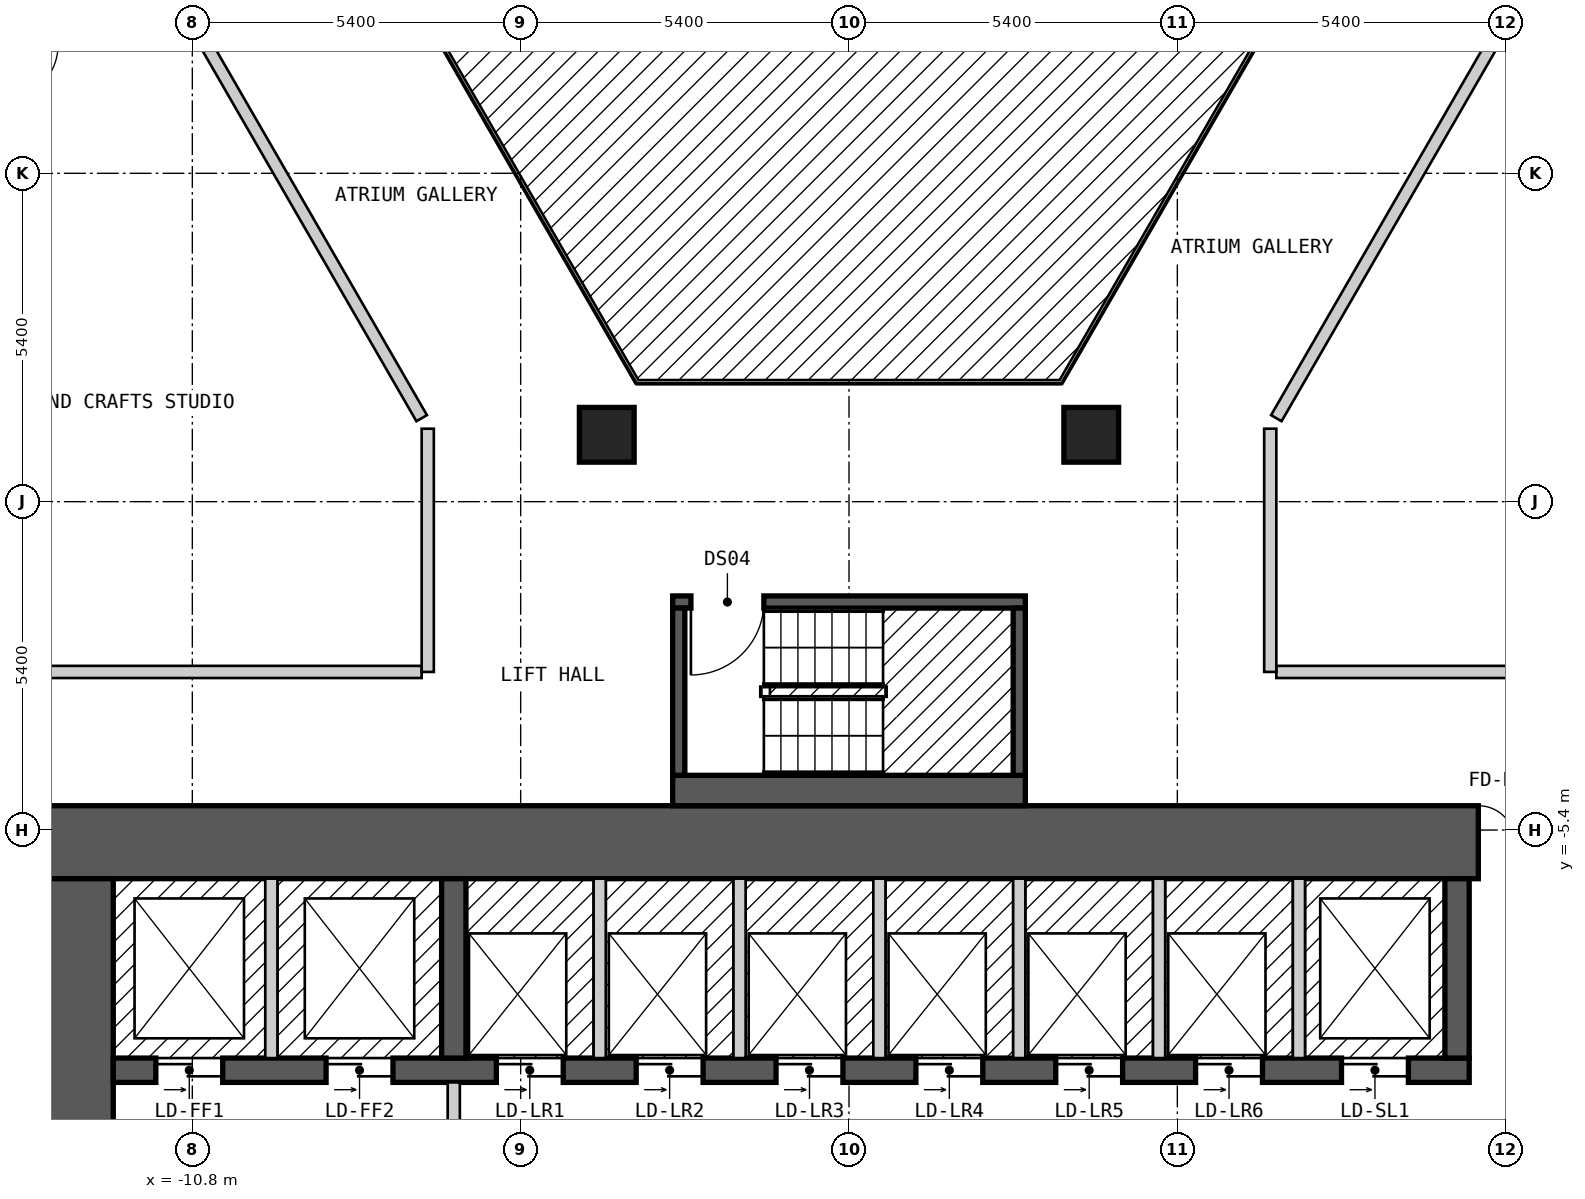
"""IFC4 building model, lengths in metres.
Left out: names, types, materials, properties, quantities, classifications, styles, units other than length and angle.
Written with IfcOpenShell. Run it as: python <this file> out.ifc"""

import sys

from ifc_helpers import new_model, si_unit, direction, frame, frame_2d, origin, origin_2d, place, context, subcontext, project, spatial, rectangle, extrude, element, fill, save


model = new_model("IFC4")
c1 = context("Model", 3, precision=1e-05, world=origin(), true_north=direction((0.0, 1.0)))
c2 = subcontext(c1, "Body", "Model", "MODEL_VIEW")
j1 = project(units=[si_unit("LENGTHUNIT", "METRE"), si_unit("PLANEANGLEUNIT", "RADIAN")], contexts=[c1])
p1 = place(None, origin())
s1 = spatial("IfcSite", under=j1, at=p1, CompositionType="ELEMENT")
p2 = place(p1, origin())
s2 = spatial("IfcBuilding", under=s1, at=p2, CompositionType="ELEMENT")
p3 = place(p2, frame((0.0, 0.0, 29.4)))
s3 = spatial("IfcBuildingStorey", under=s2, at=p3, CompositionType="ELEMENT", Elevation=29.4)
for number, where, z_axis, x_axis in (
    (1, (3.984, 1.1, 0.0), (0.0, 0.0, 1.0), (1.0, 0.0, 0.0)),
    (2, (-3.984, 1.1, 0.0), (0.0, 0.0, 1.0), (1.0, 0.0, 0.0)),
):
    element("IfcColumn", number, at=place(p3, frame(where, z_axis=z_axis, x_axis=x_axis)), inside=s3, PredefinedType="COLUMN", context=c2, shape_type="SweptSolid", body=[
        extrude(rectangle(XDim=0.9, YDim=0.9, at=origin_2d()), origin(), (0.0, 0.0, 1.0), 3.0),
    ])
p4 = place(p3, frame((-13.3, -5.6, 0.0), z_axis=(0.0, 0.0, 1.0), x_axis=(1.0, 0.0, 0.0)))
e3 = element("IfcWall", 3, at=p4, inside=s3, PredefinedType="SHEAR", context=c2, shape_type="SweptSolid", body=[
    extrude(rectangle(XDim=26.6, YDim=1.2, at=frame_2d((13.3, 0.0))), origin(), (0.0, 0.0, 1.0), 2.7),
])
p5 = place(p4, frame((23.65, 0.0, 0.0)))
e4 = element("IfcOpeningElement", 4, at=p5, cuts=e3, PredefinedType="OPENING", context=c2, shape_type="SweptSolid", body=[
    extrude(rectangle(XDim=1.2, YDim=2.1, at=frame_2d((0.6, 1.05))), frame((0.0, 0.61, 0.0), z_axis=(0.0, -1.0, 0.0), x_axis=(1.0, 0.0, 0.0)), (0.0, 0.0, 1.0), 1.22),
])
p6 = place(p3, frame((-12.7, -17.8, 0.0), z_axis=(0.0, 0.0, 1.0), x_axis=(0.0, 1.0, 0.0)))
e5 = element("IfcWall", 5, at=p6, inside=s3, PredefinedType="SHEAR", context=c2, shape_type="SweptSolid", body=[
    extrude(rectangle(XDim=11.6, YDim=1.2, at=frame_2d((5.8, 0.0))), origin(), (0.0, 0.0, 1.0), 2.7),
])
p7 = place(p6, frame((3.6, 0.0, 0.0)))
e6 = element("IfcOpeningElement", 6, at=p7, cuts=e5, PredefinedType="OPENING", context=c2, shape_type="SweptSolid", body=[
    extrude(rectangle(XDim=1.2, YDim=2.1, at=frame_2d((0.6, 1.05))), frame((0.0, 0.61, 0.0), z_axis=(0.0, -1.0, 0.0), x_axis=(1.0, 0.0, 0.0)), (0.0, 0.0, 1.0), 1.22),
])
p8 = place(p3, frame((-12.1, -9.35, 0.0), z_axis=(0.0, 0.0, 1.0), x_axis=(1.0, 0.0, 0.0)))
e7 = element("IfcWall", 7, at=p8, inside=s3, PredefinedType="SHEAR", context=c2, shape_type="SweptSolid", body=[
    extrude(rectangle(XDim=22.3, YDim=0.4, at=frame_2d((11.15, 0.0))), origin(), (0.0, 0.0, 1.0), 2.7),
])
p9 = place(p8, frame((0.7, 0.0, 0.0)))
e8 = element("IfcOpeningElement", 8, at=p9, cuts=e7, PredefinedType="OPENING", context=c2, shape_type="SweptSolid", body=[
    extrude(rectangle(XDim=1.1, YDim=2.1, at=frame_2d((0.55, 1.05))), frame((0.0, 0.21, 0.0), z_axis=(0.0, -1.0, 0.0), x_axis=(1.0, 0.0, 0.0)), (0.0, 0.0, 1.0), 0.42),
])
p10 = place(p8, frame((3.5, 0.0, 0.0)))
e9 = element("IfcOpeningElement", 9, at=p10, cuts=e7, PredefinedType="OPENING", context=c2, shape_type="SweptSolid", body=[
    extrude(rectangle(XDim=1.1, YDim=2.1, at=frame_2d((0.55, 1.05))), frame((0.0, 0.21, 0.0), z_axis=(0.0, -1.0, 0.0), x_axis=(1.0, 0.0, 0.0)), (0.0, 0.0, 1.0), 0.42),
])
p11 = place(p8, frame((6.3, 0.0, 0.0)))
e10 = element("IfcOpeningElement", 10, at=p11, cuts=e7, PredefinedType="OPENING", context=c2, shape_type="SweptSolid", body=[
    extrude(rectangle(XDim=1.1, YDim=2.1, at=frame_2d((0.55, 1.05))), frame((0.0, 0.21, 0.0), z_axis=(0.0, -1.0, 0.0), x_axis=(1.0, 0.0, 0.0)), (0.0, 0.0, 1.0), 0.42),
])
p12 = place(p8, frame((8.6, 0.0, 0.0)))
e11 = element("IfcOpeningElement", 11, at=p12, cuts=e7, PredefinedType="OPENING", context=c2, shape_type="SweptSolid", body=[
    extrude(rectangle(XDim=1.1, YDim=2.1, at=frame_2d((0.55, 1.05))), frame((0.0, 0.21, 0.0), z_axis=(0.0, -1.0, 0.0), x_axis=(1.0, 0.0, 0.0)), (0.0, 0.0, 1.0), 0.42),
])
p13 = place(p8, frame((10.9, 0.0, 0.0)))
e12 = element("IfcOpeningElement", 12, at=p13, cuts=e7, PredefinedType="OPENING", context=c2, shape_type="SweptSolid", body=[
    extrude(rectangle(XDim=1.1, YDim=2.1, at=frame_2d((0.55, 1.05))), frame((0.0, 0.21, 0.0), z_axis=(0.0, -1.0, 0.0), x_axis=(1.0, 0.0, 0.0)), (0.0, 0.0, 1.0), 0.42),
])
p14 = place(p8, frame((13.2, 0.0, 0.0)))
e13 = element("IfcOpeningElement", 13, at=p14, cuts=e7, PredefinedType="OPENING", context=c2, shape_type="SweptSolid", body=[
    extrude(rectangle(XDim=1.1, YDim=2.1, at=frame_2d((0.55, 1.05))), frame((0.0, 0.21, 0.0), z_axis=(0.0, -1.0, 0.0), x_axis=(1.0, 0.0, 0.0)), (0.0, 0.0, 1.0), 0.42),
])
p15 = place(p8, frame((15.5, 0.0, 0.0)))
e14 = element("IfcOpeningElement", 14, at=p15, cuts=e7, PredefinedType="OPENING", context=c2, shape_type="SweptSolid", body=[
    extrude(rectangle(XDim=1.1, YDim=2.1, at=frame_2d((0.55, 1.05))), frame((0.0, 0.21, 0.0), z_axis=(0.0, -1.0, 0.0), x_axis=(1.0, 0.0, 0.0)), (0.0, 0.0, 1.0), 0.42),
])
p16 = place(p8, frame((17.8, 0.0, 0.0)))
e15 = element("IfcOpeningElement", 15, at=p16, cuts=e7, PredefinedType="OPENING", context=c2, shape_type="SweptSolid", body=[
    extrude(rectangle(XDim=1.1, YDim=2.1, at=frame_2d((0.55, 1.05))), frame((0.0, 0.21, 0.0), z_axis=(0.0, -1.0, 0.0), x_axis=(1.0, 0.0, 0.0)), (0.0, 0.0, 1.0), 0.42),
])
p17 = place(p8, frame((20.2, 0.0, 0.0)))
e16 = element("IfcOpeningElement", 16, at=p17, cuts=e7, PredefinedType="OPENING", context=c2, shape_type="SweptSolid", body=[
    extrude(rectangle(XDim=1.1, YDim=2.1, at=frame_2d((0.55, 1.05))), frame((0.0, 0.21, 0.0), z_axis=(0.0, -1.0, 0.0), x_axis=(1.0, 0.0, 0.0)), (0.0, 0.0, 1.0), 0.42),
])
for number, where, z_axis, x_axis in (
    (17, (-6.5, -9.15, 0.0), (0.0, 0.0, 1.0), (0.0, 1.0, 0.0)),
    (18, (10.0, -9.15, 0.0), (0.0, 0.0, 1.0), (0.0, 1.0, 0.0)),
):
    element("IfcWall", number, at=place(p3, frame(where, z_axis=z_axis, x_axis=x_axis)), inside=s3, PredefinedType="SHEAR", context=c2, shape_type="SweptSolid", body=[
        extrude(rectangle(XDim=2.95, YDim=0.4, at=frame_2d((1.475, 0.0))), origin(), (0.0, 0.0, 1.0), 2.7),
    ])
p18 = place(p3, frame((-2.9, -4.75, 0.0), z_axis=(0.0, 0.0, 1.0), x_axis=(1.0, 0.0, 0.0)))
e19 = element("IfcWall", 19, at=p18, inside=s3, PredefinedType="SOLIDWALL", context=c2, shape_type="SweptSolid", body=[
    extrude(rectangle(XDim=5.8, YDim=0.5, at=frame_2d((2.9, 0.0))), origin(), (0.0, 0.0, 1.0), 2.7),
])
p19 = place(p3, frame((-2.9, -1.65, 0.0), z_axis=(0.0, 0.0, 1.0), x_axis=(1.0, 0.0, 0.0)))
e20 = element("IfcWall", 20, at=p19, inside=s3, PredefinedType="SOLIDWALL", context=c2, shape_type="SweptSolid", body=[
    extrude(rectangle(XDim=5.8, YDim=0.2, at=frame_2d((2.9, 0.0))), origin(), (0.0, 0.0, 1.0), 2.7),
])
p20 = place(p19, frame((0.3, 0.0, 0.0)))
e21 = element("IfcOpeningElement", 21, at=p20, cuts=e20, PredefinedType="OPENING", context=c2, shape_type="SweptSolid", body=[
    extrude(rectangle(XDim=1.2, YDim=2.1, at=frame_2d((0.6, 1.05))), frame((0.0, 0.11, 0.0), z_axis=(0.0, -1.0, 0.0), x_axis=(1.0, 0.0, 0.0)), (0.0, 0.0, 1.0), 0.22),
])
for number, where, z_axis, x_axis in (
    (22, (-2.8, -4.5, 0.0), (0.0, 0.0, 1.0), (0.0, 1.0, 0.0)),
    (23, (2.8, -4.5, 0.0), (0.0, 0.0, 1.0), (0.0, 1.0, 0.0)),
):
    element("IfcWall", number, at=place(p3, frame(where, z_axis=z_axis, x_axis=x_axis)), inside=s3, PredefinedType="SOLIDWALL", context=c2, shape_type="SweptSolid", body=[
        extrude(rectangle(XDim=2.75, YDim=0.2, at=frame_2d((1.375, 0.0))), origin(), (0.0, 0.0, 1.0), 2.7),
    ])
p21 = place(p3, frame((-10.796, 7.9, 0.0), z_axis=(0.0, 0.0, 1.0), x_axis=(0.499954271211, -0.866051803703, 0.0)))
e24 = element("IfcWall", 24, at=p21, inside=s3, PredefinedType="PARTITIONING", context=c2, shape_type="SweptSolid", body=[
    extrude(rectangle(XDim=7.536, YDim=0.2, at=frame_2d((3.768, 0.0))), origin(), (0.0, 0.0, 1.0), 2.7),
])
p22 = place(p3, frame((9.18, 15.7, 0.0), z_axis=(0.0, 0.0, 1.0), x_axis=(0.500003652032, -0.866023295272, 0.0)))
e25 = element("IfcWall", 25, at=p22, inside=s3, PredefinedType="PARTITIONING", context=c2, shape_type="SweptSolid", body=[
    extrude(rectangle(XDim=18.012, YDim=0.2, at=frame_2d((9.006, 0.0))), origin(), (0.0, 0.0, 1.0), 2.7),
])
p23 = place(p22, frame((8.556, 0.0, 0.0)))
e26 = element("IfcOpeningElement", 26, at=p23, cuts=e25, PredefinedType="OPENING", context=c2, shape_type="SweptSolid", body=[
    extrude(rectangle(XDim=0.9, YDim=2.1, at=frame_2d((0.45, 1.05))), frame((0.0, 0.11, 0.0), z_axis=(0.0, -1.0, 0.0), x_axis=(1.0, 0.0, 0.0)), (0.0, 0.0, 1.0), 0.22),
])
p24 = place(p3, frame((10.45, 17.9, 0.0), z_axis=(0.0, 0.0, 1.0), x_axis=(0.500034352617, -0.866005569383, 0.0)))
e27 = element("IfcWall", 27, at=p24, inside=s3, PredefinedType="PARTITIONING", context=c2, shape_type="SweptSolid", body=[
    extrude(rectangle(XDim=20.553, YDim=0.2, at=frame_2d((10.276, 0.0))), origin(), (0.0, 0.0, 1.0), 2.7),
])
p25 = place(p24, frame((14.903, 0.0, 0.0)))
e28 = element("IfcOpeningElement", 28, at=p25, cuts=e27, PredefinedType="OPENING", context=c2, shape_type="SweptSolid", body=[
    extrude(rectangle(XDim=1.0, YDim=2.1, at=frame_2d((0.5, 1.05))), frame((0.0, 0.11, 0.0), z_axis=(0.0, -1.0, 0.0), x_axis=(1.0, 0.0, 0.0)), (0.0, 0.0, 1.0), 0.22),
])
p26 = place(p24, frame((9.775, 0.0, 0.0)))
e29 = element("IfcOpeningElement", 29, at=p26, cuts=e27, PredefinedType="OPENING", context=c2, shape_type="SweptSolid", body=[
    extrude(rectangle(XDim=1.0, YDim=2.1, at=frame_2d((0.5, 1.05))), frame((0.0, 0.11, 0.0), z_axis=(0.0, -1.0, 0.0), x_axis=(1.0, 0.0, 0.0)), (0.0, 0.0, 1.0), 0.22),
])
for number, where, z_axis, x_axis in (
    (30, (-15.4, -2.8, 0.0), (0.0, 0.0, 1.0), (1.0, 0.0, 0.0)),
    (31, (7.028, -2.8, 0.0), (0.0, 0.0, 1.0), (1.0, 0.0, 0.0)),
):
    element("IfcWall", number, at=place(p3, frame(where, z_axis=z_axis, x_axis=x_axis)), inside=s3, PredefinedType="PARTITIONING", context=c2, shape_type="SweptSolid", body=[
        extrude(rectangle(XDim=8.372, YDim=0.2, at=frame_2d((4.186, 0.0))), origin(), (0.0, 0.0, 1.0), 2.7),
    ])
p27 = place(p3, frame((7.028, 1.373, 0.0), z_axis=(0.0, 0.0, 1.0), x_axis=(0.49998574534, 0.86603363356, 0.0)))
e32 = element("IfcWall", 32, at=p27, inside=s3, PredefinedType="PARTITIONING", context=c2, shape_type="SweptSolid", body=[
    extrude(rectangle(XDim=7.652, YDim=0.2, at=frame_2d((3.826, 0.0))), origin(), (0.0, 0.0, 1.0), 2.7),
])
p28 = place(p3, frame((-18.244, -0.001, 0.0), z_axis=(0.0, 0.0, 1.0), x_axis=(0.499962999376, 0.866046765051, 0.0)))
e33 = element("IfcWall", 33, at=p28, inside=s3, PredefinedType="PARTITIONING", context=c2, shape_type="SweptSolid", body=[
    extrude(rectangle(XDim=18.245, YDim=0.2, at=frame_2d((9.123, 0.0))), origin(), (0.0, 0.0, 1.0), 2.7),
])
p29 = place(p28, frame((8.672, 0.0, 0.0)))
e34 = element("IfcOpeningElement", 34, at=p29, cuts=e33, PredefinedType="OPENING", context=c2, shape_type="SweptSolid", body=[
    extrude(rectangle(XDim=0.9, YDim=2.1, at=frame_2d((0.45, 1.05))), frame((0.0, 0.11, 0.0), z_axis=(0.0, -1.0, 0.0), x_axis=(1.0, 0.0, 0.0)), (0.0, 0.0, 1.0), 0.22),
])
p30 = place(p3, frame((-20.727, 0.099, 0.0), z_axis=(0.0, 0.0, 1.0), x_axis=(0.499993204491, 0.866029327138, 0.0)))
e35 = element("IfcWall", 35, at=p30, inside=s3, PredefinedType="PARTITIONING", context=c2, shape_type="SweptSolid", body=[
    extrude(rectangle(XDim=20.554, YDim=0.2, at=frame_2d((10.277, 0.0))), origin(), (0.0, 0.0, 1.0), 2.7),
])
p31 = place(p30, frame((14.88, 0.0, 0.0)))
e36 = element("IfcOpeningElement", 36, at=p31, cuts=e35, PredefinedType="OPENING", context=c2, shape_type="SweptSolid", body=[
    extrude(rectangle(XDim=1.0, YDim=2.1, at=frame_2d((0.5, 1.05))), frame((0.0, 0.11, 0.0), z_axis=(0.0, -1.0, 0.0), x_axis=(1.0, 0.0, 0.0)), (0.0, 0.0, 1.0), 0.22),
])
p32 = place(p30, frame((4.673, 0.0, 0.0)))
e37 = element("IfcOpeningElement", 37, at=p32, cuts=e35, PredefinedType="OPENING", context=c2, shape_type="SweptSolid", body=[
    extrude(rectangle(XDim=1.0, YDim=2.1, at=frame_2d((0.5, 1.05))), frame((0.0, 0.11, 0.0), z_axis=(0.0, -1.0, 0.0), x_axis=(1.0, 0.0, 0.0)), (0.0, 0.0, 1.0), 0.22),
])
for number, where, z_axis, x_axis in (
    (38, (6.928, -2.8, 0.0), (0.0, 0.0, 1.0), (0.0, 1.0, 0.0)),
    (39, (-6.928, -2.8, 0.0), (0.0, 0.0, 1.0), (0.0, 1.0, 0.0)),
):
    element("IfcWall", number, at=place(p3, frame(where, z_axis=z_axis, x_axis=x_axis)), inside=s3, PredefinedType="PARTITIONING", context=c2, shape_type="SweptSolid", body=[
        extrude(rectangle(XDim=4.0, YDim=0.2, at=frame_2d((2.0, 0.0))), origin(), (0.0, 0.0, 1.0), 2.7),
    ])
p33 = place(p3, frame((-9.5, -9.15, 0.0), z_axis=(0.0, 0.0, 1.0), x_axis=(0.0, 1.0, 0.0)))
e40 = element("IfcWall", 40, at=p33, inside=s3, PredefinedType="SOLIDWALL", context=c2, shape_type="SweptSolid", body=[
    extrude(rectangle(XDim=2.95, YDim=0.2, at=frame_2d((1.475, 0.0))), origin(), (0.0, 0.0, 1.0), 2.7),
])
p34 = place(p3, frame((-6.5, -14.45, 0.0), z_axis=(0.0, 0.0, 1.0), x_axis=(0.0, 1.0, 0.0)))
e41 = element("IfcWall", 41, at=p34, inside=s3, PredefinedType="PARTITIONING", context=c2, shape_type="SweptSolid", body=[
    extrude(rectangle(XDim=4.9, YDim=0.2, at=frame_2d((2.45, 0.0))), origin(), (0.0, 0.0, 1.0), 2.7),
])
p35 = place(p34, frame((3.15, 0.0, 0.0), z_axis=(0.0, 0.0, 1.0), x_axis=(-1.0, 0.0, 0.0)))
e42 = element("IfcOpeningElement", 42, at=p35, cuts=e41, PredefinedType="OPENING", context=c2, shape_type="SweptSolid", body=[
    extrude(rectangle(XDim=1.4, YDim=2.1, at=frame_2d((0.7, 1.05))), frame((0.0, 0.11, 0.0), z_axis=(0.0, -1.0, 0.0), x_axis=(1.0, 0.0, 0.0)), (0.0, 0.0, 1.0), 0.22),
])
for number, where, z_axis, x_axis in (
    (43, (-4.1, -9.15, 0.0), (0.0, 0.0, 1.0), (0.0, 1.0, 0.0)),
    (44, (-1.8, -9.15, 0.0), (0.0, 0.0, 1.0), (0.0, 1.0, 0.0)),
    (45, (0.5, -9.15, 0.0), (0.0, 0.0, 1.0), (0.0, 1.0, 0.0)),
    (46, (2.8, -9.15, 0.0), (0.0, 0.0, 1.0), (0.0, 1.0, 0.0)),
    (47, (5.1, -9.15, 0.0), (0.0, 0.0, 1.0), (0.0, 1.0, 0.0)),
    (48, (7.4, -9.15, 0.0), (0.0, 0.0, 1.0), (0.0, 1.0, 0.0)),
):
    element("IfcWall", number, at=place(p3, frame(where, z_axis=z_axis, x_axis=x_axis)), inside=s3, PredefinedType="SOLIDWALL", context=c2, shape_type="SweptSolid", body=[
        extrude(rectangle(XDim=2.95, YDim=0.2, at=frame_2d((1.475, 0.0))), origin(), (0.0, 0.0, 1.0), 2.7),
    ])
p36 = place(p20, origin())
e49 = element("IfcDoor", 49, at=p36, inside=s3, OperationType="SINGLE_SWING_LEFT", PredefinedType="DOOR", context=c2, shape_type="SweptSolid", body=[
    extrude(rectangle(XDim=1.2, YDim=2.1, at=frame_2d((0.6, 1.05))), frame((0.0, 0.025, 0.0), z_axis=(0.0, -1.0, 0.0), x_axis=(1.0, 0.0, 0.0)), (0.0, 0.0, 1.0), 0.05),
])
fill(e21, e49)
p37 = place(p9, origin())
e50 = element("IfcDoor", 50, at=p37, inside=s3, OperationType="DOUBLE_DOOR_SLIDING", PredefinedType="DOOR", context=c2, shape_type="SweptSolid", body=[
    extrude(rectangle(XDim=1.1, YDim=2.1, at=frame_2d((0.55, 1.05))), frame((0.0, 0.025, 0.0), z_axis=(0.0, -1.0, 0.0), x_axis=(1.0, 0.0, 0.0)), (0.0, 0.0, 1.0), 0.05),
])
fill(e8, e50)
p38 = place(p10, origin())
e51 = element("IfcDoor", 51, at=p38, inside=s3, OperationType="DOUBLE_DOOR_SLIDING", PredefinedType="DOOR", context=c2, shape_type="SweptSolid", body=[
    extrude(rectangle(XDim=1.1, YDim=2.1, at=frame_2d((0.55, 1.05))), frame((0.0, 0.025, 0.0), z_axis=(0.0, -1.0, 0.0), x_axis=(1.0, 0.0, 0.0)), (0.0, 0.0, 1.0), 0.05),
])
fill(e9, e51)
p39 = place(p11, origin())
e52 = element("IfcDoor", 52, at=p39, inside=s3, OperationType="DOUBLE_DOOR_SLIDING", PredefinedType="DOOR", context=c2, shape_type="SweptSolid", body=[
    extrude(rectangle(XDim=1.1, YDim=2.1, at=frame_2d((0.55, 1.05))), frame((0.0, 0.025, 0.0), z_axis=(0.0, -1.0, 0.0), x_axis=(1.0, 0.0, 0.0)), (0.0, 0.0, 1.0), 0.05),
])
fill(e10, e52)
p40 = place(p12, origin())
e53 = element("IfcDoor", 53, at=p40, inside=s3, OperationType="DOUBLE_DOOR_SLIDING", PredefinedType="DOOR", context=c2, shape_type="SweptSolid", body=[
    extrude(rectangle(XDim=1.1, YDim=2.1, at=frame_2d((0.55, 1.05))), frame((0.0, 0.025, 0.0), z_axis=(0.0, -1.0, 0.0), x_axis=(1.0, 0.0, 0.0)), (0.0, 0.0, 1.0), 0.05),
])
fill(e11, e53)
p41 = place(p13, origin())
e54 = element("IfcDoor", 54, at=p41, inside=s3, OperationType="DOUBLE_DOOR_SLIDING", PredefinedType="DOOR", context=c2, shape_type="SweptSolid", body=[
    extrude(rectangle(XDim=1.1, YDim=2.1, at=frame_2d((0.55, 1.05))), frame((0.0, 0.025, 0.0), z_axis=(0.0, -1.0, 0.0), x_axis=(1.0, 0.0, 0.0)), (0.0, 0.0, 1.0), 0.05),
])
fill(e12, e54)
p42 = place(p14, origin())
e55 = element("IfcDoor", 55, at=p42, inside=s3, OperationType="DOUBLE_DOOR_SLIDING", PredefinedType="DOOR", context=c2, shape_type="SweptSolid", body=[
    extrude(rectangle(XDim=1.1, YDim=2.1, at=frame_2d((0.55, 1.05))), frame((0.0, 0.025, 0.0), z_axis=(0.0, -1.0, 0.0), x_axis=(1.0, 0.0, 0.0)), (0.0, 0.0, 1.0), 0.05),
])
fill(e13, e55)
p43 = place(p15, origin())
e56 = element("IfcDoor", 56, at=p43, inside=s3, OperationType="DOUBLE_DOOR_SLIDING", PredefinedType="DOOR", context=c2, shape_type="SweptSolid", body=[
    extrude(rectangle(XDim=1.1, YDim=2.1, at=frame_2d((0.55, 1.05))), frame((0.0, 0.025, 0.0), z_axis=(0.0, -1.0, 0.0), x_axis=(1.0, 0.0, 0.0)), (0.0, 0.0, 1.0), 0.05),
])
fill(e14, e56)
p44 = place(p16, origin())
e57 = element("IfcDoor", 57, at=p44, inside=s3, OperationType="DOUBLE_DOOR_SLIDING", PredefinedType="DOOR", context=c2, shape_type="SweptSolid", body=[
    extrude(rectangle(XDim=1.1, YDim=2.1, at=frame_2d((0.55, 1.05))), frame((0.0, 0.025, 0.0), z_axis=(0.0, -1.0, 0.0), x_axis=(1.0, 0.0, 0.0)), (0.0, 0.0, 1.0), 0.05),
])
fill(e15, e57)
p45 = place(p17, origin())
e58 = element("IfcDoor", 58, at=p45, inside=s3, OperationType="DOUBLE_DOOR_SLIDING", PredefinedType="DOOR", context=c2, shape_type="SweptSolid", body=[
    extrude(rectangle(XDim=1.1, YDim=2.1, at=frame_2d((0.55, 1.05))), frame((0.0, 0.025, 0.0), z_axis=(0.0, -1.0, 0.0), x_axis=(1.0, 0.0, 0.0)), (0.0, 0.0, 1.0), 0.05),
])
fill(e16, e58)
p46 = place(p5, origin())
e59 = element("IfcDoor", 59, at=p46, inside=s3, OperationType="DOUBLE_DOOR_SINGLE_SWING", PredefinedType="DOOR", context=c2, shape_type="SweptSolid", body=[
    extrude(rectangle(XDim=1.2, YDim=2.1, at=frame_2d((0.6, 1.05))), frame((0.0, 0.025, 0.0), z_axis=(0.0, -1.0, 0.0), x_axis=(1.0, 0.0, 0.0)), (0.0, 0.0, 1.0), 0.05),
])
fill(e4, e59)
save(model, sys.argv[1])
